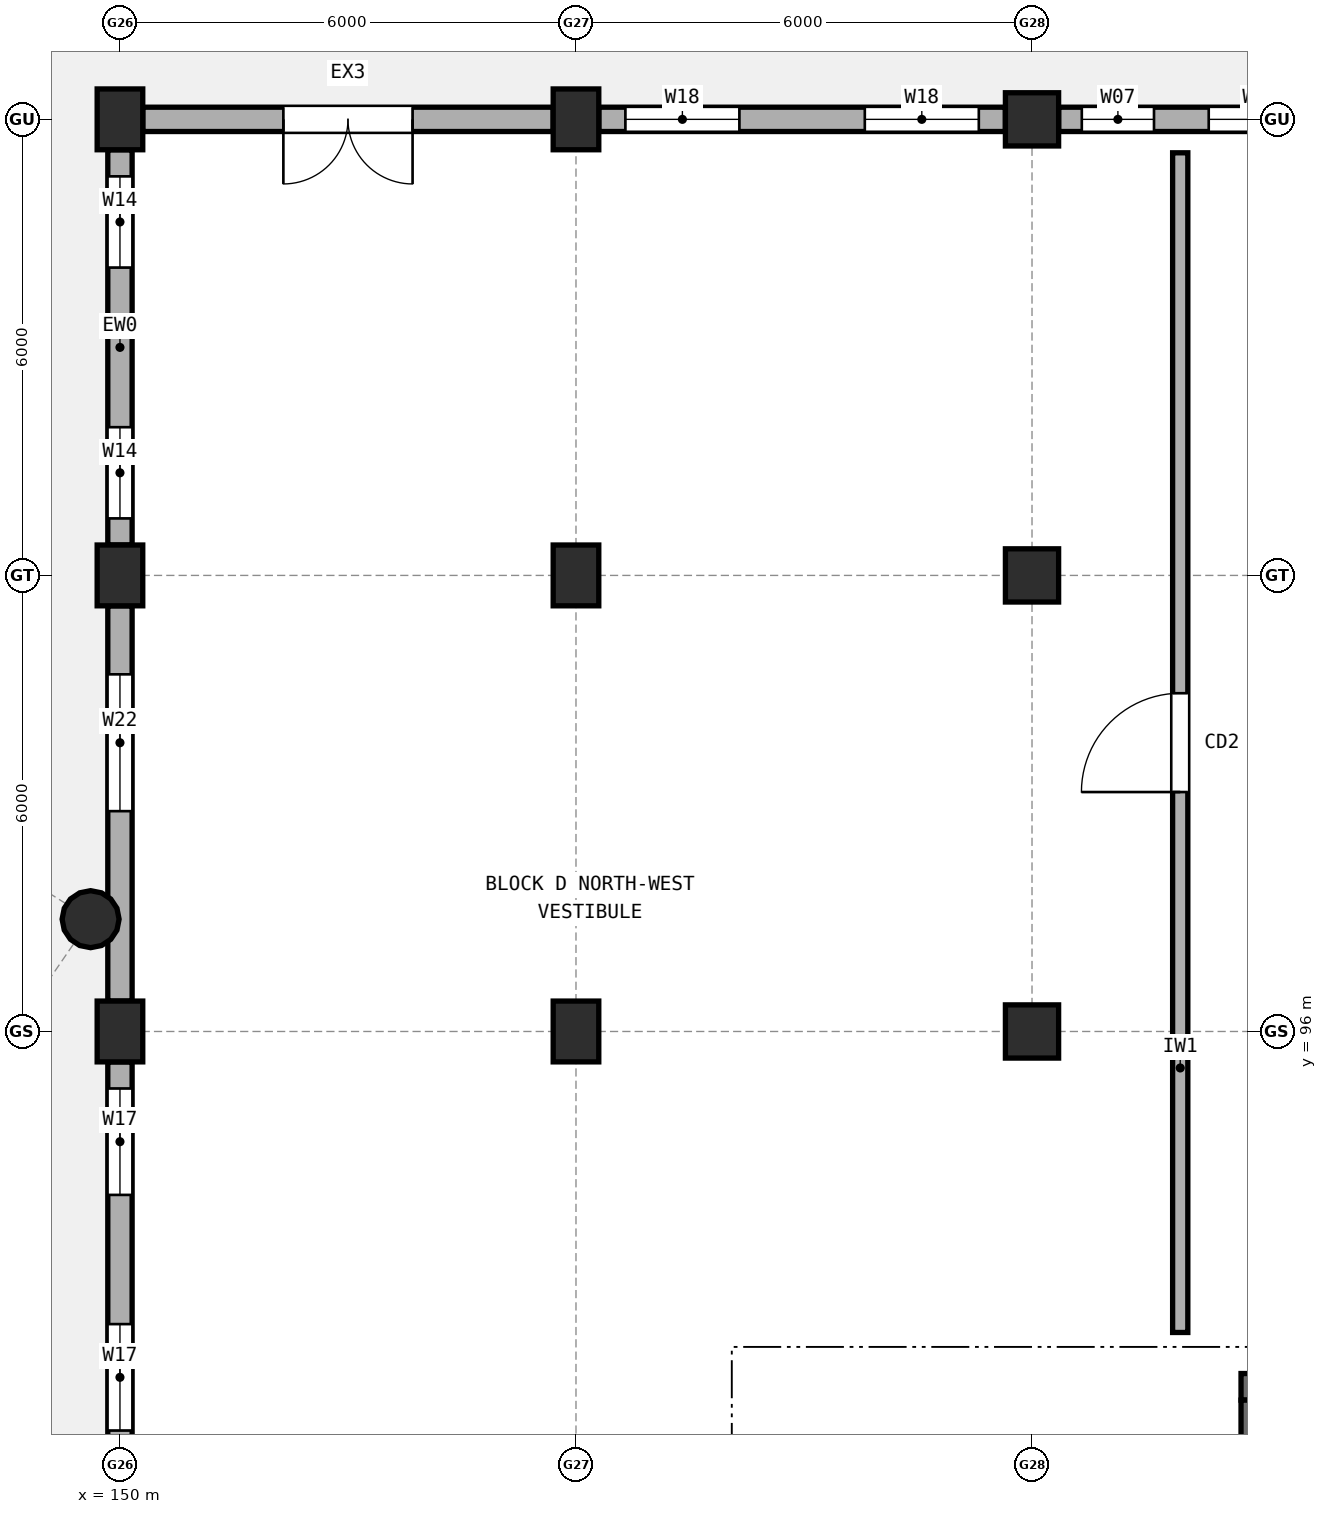
"""IFC4 building model, lengths in metres.
Left out: names, types, materials, properties, quantities, classifications, styles, units other than length and angle.
Written with IfcOpenShell. Run it as: python <this file> out.ifc"""

import sys

from ifc_helpers import new_model, si_unit, direction, frame, frame_2d, origin, origin_2d, place, context, subcontext, project, spatial, rectangle, circle, extrude, element, fill, save


model = new_model("IFC4")
c1 = context("Model", 3, precision=1e-05, world=origin(), true_north=direction((0.0, 1.0)))
c2 = subcontext(c1, "Body", "Model", "MODEL_VIEW")
j1 = project(units=[si_unit("LENGTHUNIT", "METRE"), si_unit("PLANEANGLEUNIT", "RADIAN")], contexts=[c1])
p1 = place(None, origin())
s1 = spatial("IfcSite", under=j1, at=p1, CompositionType="ELEMENT")
p2 = place(p1, origin())
s2 = spatial("IfcBuilding", under=s1, at=p2, CompositionType="ELEMENT")
p3 = place(p2, origin())
s3 = spatial("IfcBuildingStorey", under=s2, at=p3, CompositionType="ELEMENT", Elevation=0.0)
for number, where, z_axis, x_axis in (
    (1, (150.0, 96.0, 0.0), (0.0, 0.0, 1.0), (1.0, 0.0, 0.0)),
    (2, (150.0, 102.0, 0.0), (0.0, 0.0, 1.0), (1.0, 0.0, 0.0)),
    (3, (150.0, 108.0, 0.0), (0.0, 0.0, 1.0), (1.0, 0.0, 0.0)),
    (4, (156.0, 96.0, 0.0), (0.0, 0.0, 1.0), (1.0, 0.0, 0.0)),
    (5, (156.0, 102.0, 0.0), (0.0, 0.0, 1.0), (1.0, 0.0, 0.0)),
    (6, (156.0, 108.0, 0.0), (0.0, 0.0, 1.0), (1.0, 0.0, 0.0)),
):
    element("IfcColumn", number, at=place(p3, frame(where, z_axis=z_axis, x_axis=x_axis)), inside=s3, PredefinedType="COLUMN", context=c2, shape_type="SweptSolid", body=[
        extrude(rectangle(XDim=0.6, YDim=0.8, at=origin_2d()), origin(), (0.0, 0.0, 1.0), 4.23),
    ])
for number, where, z_axis, x_axis in (
    (7, (162.0, 96.0, 0.0), (0.0, 0.0, 1.0), (1.0, 0.0, 0.0)),
    (8, (162.0, 102.0, 0.0), (0.0, 0.0, 1.0), (1.0, 0.0, 0.0)),
    (9, (162.0, 108.0, 0.0), (0.0, 0.0, 1.0), (1.0, 0.0, 0.0)),
):
    element("IfcColumn", number, at=place(p3, frame(where, z_axis=z_axis, x_axis=x_axis)), inside=s3, PredefinedType="COLUMN", context=c2, shape_type="SweptSolid", body=[
        extrude(rectangle(XDim=0.7, YDim=0.7, at=origin_2d()), origin(), (0.0, 0.0, 1.0), 4.23),
    ])
p4 = place(p3, frame((149.614, 97.477, 0.0), z_axis=(0.0, 0.0, 1.0), x_axis=(1.0, 0.0, 0.0)))
e10 = element("IfcColumn", 10, at=p4, inside=s3, PredefinedType="COLUMN", context=c2, shape_type="SweptSolid", body=[
    extrude(circle(Radius=0.375, at=origin_2d()), origin(), (0.0, 0.0, 1.0), 4.248),
])
p5 = place(p3, frame((167.65, 108.0, 0.0), z_axis=(0.0, 0.0, 1.0), x_axis=(-1.0, 0.0, 0.0)))
e11 = element("IfcWall", 11, at=p5, inside=s3, PredefinedType="STANDARD", context=c2, shape_type="SweptSolid", body=[
    extrude(rectangle(XDim=5.3, YDim=0.32, at=frame_2d((2.65, 0.0))), origin(), (0.0, 0.0, 1.0), 3.112),
])
p6 = place(p5, frame((0.33, 0.0, 0.9)))
e12 = element("IfcOpeningElement", 12, at=p6, cuts=e11, PredefinedType="OPENING", context=c2, shape_type="SweptSolid", body=[
    extrude(rectangle(XDim=0.9, YDim=1.4, at=frame_2d((0.45, 0.7))), frame((0.0, 0.17, 0.0), z_axis=(0.0, -1.0, 0.0), x_axis=(1.0, 0.0, 0.0)), (0.0, 0.0, 1.0), 0.34),
])
p7 = place(p5, frame((1.975, 0.0, 0.9)))
e13 = element("IfcOpeningElement", 13, at=p7, cuts=e11, PredefinedType="OPENING", context=c2, shape_type="SweptSolid", body=[
    extrude(rectangle(XDim=1.35, YDim=1.5, at=frame_2d((0.675, 0.75))), frame((0.0, 0.17, 0.0), z_axis=(0.0, -1.0, 0.0), x_axis=(1.0, 0.0, 0.0)), (0.0, 0.0, 1.0), 0.34),
])
p8 = place(p5, frame((4.045, 0.0, 0.9)))
e14 = element("IfcOpeningElement", 14, at=p8, cuts=e11, PredefinedType="OPENING", context=c2, shape_type="SweptSolid", body=[
    extrude(rectangle(XDim=0.95, YDim=1.35, at=frame_2d((0.475, 0.675))), frame((0.0, 0.17, 0.0), z_axis=(0.0, -1.0, 0.0), x_axis=(1.0, 0.0, 0.0)), (0.0, 0.0, 1.0), 0.34),
])
p9 = place(p3, frame((161.65, 108.0, 0.0), z_axis=(0.0, 0.0, 1.0), x_axis=(-1.0, 0.0, 0.0)))
e15 = element("IfcWall", 15, at=p9, inside=s3, PredefinedType="STANDARD", context=c2, shape_type="SweptSolid", body=[
    extrude(rectangle(XDim=5.35, YDim=0.32, at=frame_2d((2.675, 0.0))), origin(), (0.0, 0.0, 1.0), 3.112),
])
p10 = place(p9, frame((0.35, 0.0, 0.9)))
e16 = element("IfcOpeningElement", 16, at=p10, cuts=e15, PredefinedType="OPENING", context=c2, shape_type="SweptSolid", body=[
    extrude(rectangle(XDim=1.5, YDim=1.4, at=frame_2d((0.75, 0.7))), frame((0.0, 0.17, 0.0), z_axis=(0.0, -1.0, 0.0), x_axis=(1.0, 0.0, 0.0)), (0.0, 0.0, 1.0), 0.34),
])
p11 = place(p9, frame((3.5, 0.0, 0.9)))
e17 = element("IfcOpeningElement", 17, at=p11, cuts=e15, PredefinedType="OPENING", context=c2, shape_type="SweptSolid", body=[
    extrude(rectangle(XDim=1.5, YDim=1.4, at=frame_2d((0.75, 0.7))), frame((0.0, 0.17, 0.0), z_axis=(0.0, -1.0, 0.0), x_axis=(1.0, 0.0, 0.0)), (0.0, 0.0, 1.0), 0.34),
])
p12 = place(p3, frame((155.7, 108.0, 0.0), z_axis=(0.0, 0.0, 1.0), x_axis=(-1.0, 0.0, 0.0)))
e18 = element("IfcWall", 18, at=p12, inside=s3, PredefinedType="STANDARD", context=c2, shape_type="SweptSolid", body=[
    extrude(rectangle(XDim=5.4, YDim=0.32, at=frame_2d((2.7, 0.0))), origin(), (0.0, 0.0, 1.0), 3.112),
])
p13 = place(p12, frame((1.85, 0.0, 0.0)))
e19 = element("IfcOpeningElement", 19, at=p13, cuts=e18, PredefinedType="OPENING", context=c2, shape_type="SweptSolid", body=[
    extrude(rectangle(XDim=1.7, YDim=2.2, at=frame_2d((0.85, 1.1))), frame((0.0, 0.17, 0.0), z_axis=(0.0, -1.0, 0.0), x_axis=(1.0, 0.0, 0.0)), (0.0, 0.0, 1.0), 0.34),
])
p14 = place(p3, frame((150.0, 107.6, 0.0), z_axis=(0.0, 0.0, 1.0), x_axis=(0.0, -1.0, 0.0)))
e20 = element("IfcWall", 20, at=p14, inside=s3, PredefinedType="STANDARD", context=c2, shape_type="SweptSolid", body=[
    extrude(rectangle(XDim=5.2, YDim=0.32, at=frame_2d((2.6, 0.0))), origin(), (0.0, 0.0, 1.0), 3.712),
])
p15 = place(p14, frame((0.35, 0.0, 0.9)))
e21 = element("IfcOpeningElement", 21, at=p15, cuts=e20, PredefinedType="OPENING", context=c2, shape_type="SweptSolid", body=[
    extrude(rectangle(XDim=1.2, YDim=1.5, at=frame_2d((0.6, 0.75))), frame((0.0, 0.17, 0.0), z_axis=(0.0, -1.0, 0.0), x_axis=(1.0, 0.0, 0.0)), (0.0, 0.0, 1.0), 0.34),
])
p16 = place(p14, frame((3.65, 0.0, 0.9)))
e22 = element("IfcOpeningElement", 22, at=p16, cuts=e20, PredefinedType="OPENING", context=c2, shape_type="SweptSolid", body=[
    extrude(rectangle(XDim=1.2, YDim=1.5, at=frame_2d((0.6, 0.75))), frame((0.0, 0.17, 0.0), z_axis=(0.0, -1.0, 0.0), x_axis=(1.0, 0.0, 0.0)), (0.0, 0.0, 1.0), 0.34),
])
p17 = place(p3, frame((150.0, 101.6, 0.0), z_axis=(0.0, 0.0, 1.0), x_axis=(0.0, -1.0, 0.0)))
e23 = element("IfcWall", 23, at=p17, inside=s3, PredefinedType="STANDARD", context=c2, shape_type="SweptSolid", body=[
    extrude(rectangle(XDim=5.2, YDim=0.32, at=frame_2d((2.6, 0.0))), origin(), (0.0, 0.0, 1.0), 3.712),
])
p18 = place(p17, frame((0.901, 0.0, 0.9)))
e24 = element("IfcOpeningElement", 24, at=p18, cuts=e23, PredefinedType="OPENING", context=c2, shape_type="SweptSolid", body=[
    extrude(rectangle(XDim=1.8, YDim=1.45, at=frame_2d((0.9, 0.725))), frame((0.0, 0.17, 0.0), z_axis=(0.0, -1.0, 0.0), x_axis=(1.0, 0.0, 0.0)), (0.0, 0.0, 1.0), 0.34),
])
p19 = place(p3, frame((150.0, 95.6, 0.0), z_axis=(0.0, 0.0, 1.0), x_axis=(0.0, -1.0, 0.0)))
e25 = element("IfcWall", 25, at=p19, inside=s3, PredefinedType="STANDARD", context=c2, shape_type="SweptSolid", body=[
    extrude(rectangle(XDim=5.2, YDim=0.32, at=frame_2d((2.6, 0.0))), origin(), (0.0, 0.0, 1.0), 3.712),
])
p20 = place(p19, frame((0.35, 0.0, 0.9)))
e26 = element("IfcOpeningElement", 26, at=p20, cuts=e25, PredefinedType="OPENING", context=c2, shape_type="SweptSolid", body=[
    extrude(rectangle(XDim=1.4, YDim=1.5, at=frame_2d((0.7, 0.75))), frame((0.0, 0.17, 0.0), z_axis=(0.0, -1.0, 0.0), x_axis=(1.0, 0.0, 0.0)), (0.0, 0.0, 1.0), 0.34),
])
p21 = place(p19, frame((3.45, 0.0, 0.9)))
e27 = element("IfcOpeningElement", 27, at=p21, cuts=e25, PredefinedType="OPENING", context=c2, shape_type="SweptSolid", body=[
    extrude(rectangle(XDim=1.4, YDim=1.5, at=frame_2d((0.7, 0.75))), frame((0.0, 0.17, 0.0), z_axis=(0.0, -1.0, 0.0), x_axis=(1.0, 0.0, 0.0)), (0.0, 0.0, 1.0), 0.34),
])
p22 = place(p3, frame((169.8, 91.325, 0.0), z_axis=(0.0, 0.0, 1.0), x_axis=(-1.0, 0.0, 0.0)))
e28 = element("IfcWall", 28, at=p22, inside=s3, PredefinedType="SHEAR", context=c2, shape_type="SweptSolid", body=[
    extrude(rectangle(XDim=5.05, YDim=0.35, at=frame_2d((2.525, 0.0))), origin(), (0.0, 0.0, 1.0), 4.23),
])
p23 = place(p3, frame((164.9, 87.8, 0.0), z_axis=(0.0, 0.0, 1.0), x_axis=(0.0, 1.0, 0.0)))
e29 = element("IfcWall", 29, at=p23, inside=s3, PredefinedType="SHEAR", context=c2, shape_type="SweptSolid", body=[
    extrude(rectangle(XDim=3.35, YDim=0.3, at=frame_2d((1.675, 0.0))), origin(), (0.0, 0.0, 1.0), 4.23),
])
p24 = place(p3, frame((163.95, 92.04, 0.0), z_axis=(0.0, 0.0, 1.0), x_axis=(0.0, 1.0, 0.0)))
e30 = element("IfcWall", 30, at=p24, inside=s3, PredefinedType="SOLIDWALL", context=c2, shape_type="SweptSolid", body=[
    extrude(rectangle(XDim=15.52, YDim=0.2, at=frame_2d((7.76, 0.0))), origin(), (0.0, 0.0, 1.0), 3.562),
])
p25 = place(p24, frame((7.11, 0.0, 0.0)))
e31 = element("IfcOpeningElement", 31, at=p25, cuts=e30, PredefinedType="OPENING", context=c2, shape_type="SweptSolid", body=[
    extrude(rectangle(XDim=1.3, YDim=2.15, at=frame_2d((0.65, 1.075))), frame((0.0, 0.11, 0.0), z_axis=(0.0, -1.0, 0.0), x_axis=(1.0, 0.0, 0.0)), (0.0, 0.0, 1.0), 0.22),
])
p26 = place(p7, origin())
e32 = element("IfcWindow", 32, at=p26, inside=s3, PartitioningType="SINGLE_PANEL", PredefinedType="WINDOW", context=c2, shape_type="SweptSolid", body=[
    extrude(rectangle(XDim=1.35, YDim=1.5, at=frame_2d((0.675, 0.75))), frame((0.0, 0.03, 0.0), z_axis=(0.0, -1.0, 0.0), x_axis=(1.0, 0.0, 0.0)), (0.0, 0.0, 1.0), 0.06),
])
fill(e13, e32)
p27 = place(p8, origin())
e33 = element("IfcWindow", 33, at=p27, inside=s3, PartitioningType="SINGLE_PANEL", PredefinedType="WINDOW", context=c2, shape_type="SweptSolid", body=[
    extrude(rectangle(XDim=0.95, YDim=1.35, at=frame_2d((0.475, 0.675))), frame((0.0, 0.03, 0.0), z_axis=(0.0, -1.0, 0.0), x_axis=(1.0, 0.0, 0.0)), (0.0, 0.0, 1.0), 0.06),
])
fill(e14, e33)
p28 = place(p10, origin())
e34 = element("IfcWindow", 34, at=p28, inside=s3, PartitioningType="SINGLE_PANEL", PredefinedType="WINDOW", context=c2, shape_type="SweptSolid", body=[
    extrude(rectangle(XDim=1.5, YDim=1.4, at=frame_2d((0.75, 0.7))), frame((0.0, 0.03, 0.0), z_axis=(0.0, -1.0, 0.0), x_axis=(1.0, 0.0, 0.0)), (0.0, 0.0, 1.0), 0.06),
])
fill(e16, e34)
p29 = place(p11, origin())
e35 = element("IfcWindow", 35, at=p29, inside=s3, PartitioningType="SINGLE_PANEL", PredefinedType="WINDOW", context=c2, shape_type="SweptSolid", body=[
    extrude(rectangle(XDim=1.5, YDim=1.4, at=frame_2d((0.75, 0.7))), frame((0.0, 0.03, 0.0), z_axis=(0.0, -1.0, 0.0), x_axis=(1.0, 0.0, 0.0)), (0.0, 0.0, 1.0), 0.06),
])
fill(e17, e35)
p30 = place(p13, frame((1.7, 0.0, 0.0), z_axis=(0.0, 0.0, 1.0), x_axis=(-1.0, 0.0, 0.0)))
e36 = element("IfcDoor", 36, at=p30, inside=s3, OperationType="DOUBLE_DOOR_SINGLE_SWING", PredefinedType="DOOR", context=c2, shape_type="SweptSolid", body=[
    extrude(rectangle(XDim=1.7, YDim=2.2, at=frame_2d((0.85, 1.1))), frame((0.0, 0.025, 0.0), z_axis=(0.0, -1.0, 0.0), x_axis=(1.0, 0.0, 0.0)), (0.0, 0.0, 1.0), 0.05),
])
fill(e19, e36)
p31 = place(p15, origin())
e37 = element("IfcWindow", 37, at=p31, inside=s3, PartitioningType="SINGLE_PANEL", PredefinedType="WINDOW", context=c2, shape_type="SweptSolid", body=[
    extrude(rectangle(XDim=1.2, YDim=1.5, at=frame_2d((0.6, 0.75))), frame((0.0, 0.03, 0.0), z_axis=(0.0, -1.0, 0.0), x_axis=(1.0, 0.0, 0.0)), (0.0, 0.0, 1.0), 0.06),
])
fill(e21, e37)
p32 = place(p16, origin())
e38 = element("IfcWindow", 38, at=p32, inside=s3, PartitioningType="SINGLE_PANEL", PredefinedType="WINDOW", context=c2, shape_type="SweptSolid", body=[
    extrude(rectangle(XDim=1.2, YDim=1.5, at=frame_2d((0.6, 0.75))), frame((0.0, 0.03, 0.0), z_axis=(0.0, -1.0, 0.0), x_axis=(1.0, 0.0, 0.0)), (0.0, 0.0, 1.0), 0.06),
])
fill(e22, e38)
p33 = place(p18, origin())
e39 = element("IfcWindow", 39, at=p33, inside=s3, PartitioningType="SINGLE_PANEL", PredefinedType="WINDOW", context=c2, shape_type="SweptSolid", body=[
    extrude(rectangle(XDim=1.8, YDim=1.45, at=frame_2d((0.9, 0.725))), frame((0.0, 0.03, 0.0), z_axis=(0.0, -1.0, 0.0), x_axis=(1.0, 0.0, 0.0)), (0.0, 0.0, 1.0), 0.06),
])
fill(e24, e39)
p34 = place(p20, origin())
e40 = element("IfcWindow", 40, at=p34, inside=s3, PartitioningType="SINGLE_PANEL", PredefinedType="WINDOW", context=c2, shape_type="SweptSolid", body=[
    extrude(rectangle(XDim=1.4, YDim=1.5, at=frame_2d((0.7, 0.75))), frame((0.0, 0.03, 0.0), z_axis=(0.0, -1.0, 0.0), x_axis=(1.0, 0.0, 0.0)), (0.0, 0.0, 1.0), 0.06),
])
fill(e26, e40)
p35 = place(p21, origin())
e41 = element("IfcWindow", 41, at=p35, inside=s3, PartitioningType="SINGLE_PANEL", PredefinedType="WINDOW", context=c2, shape_type="SweptSolid", body=[
    extrude(rectangle(XDim=1.4, YDim=1.5, at=frame_2d((0.7, 0.75))), frame((0.0, 0.03, 0.0), z_axis=(0.0, -1.0, 0.0), x_axis=(1.0, 0.0, 0.0)), (0.0, 0.0, 1.0), 0.06),
])
fill(e27, e41)
p36 = place(p25, origin())
e42 = element("IfcDoor", 42, at=p36, inside=s3, OperationType="SINGLE_SWING_LEFT", PredefinedType="DOOR", context=c2, shape_type="SweptSolid", body=[
    extrude(rectangle(XDim=1.3, YDim=2.15, at=frame_2d((0.65, 1.075))), frame((0.0, 0.025, 0.0), z_axis=(0.0, -1.0, 0.0), x_axis=(1.0, 0.0, 0.0)), (0.0, 0.0, 1.0), 0.05),
])
fill(e31, e42)
save(model, sys.argv[1])
